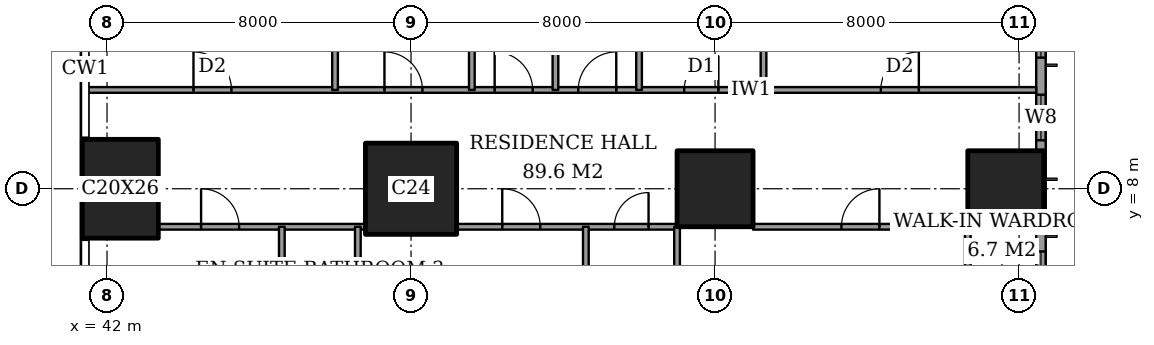
"""IFC4 building model, lengths in metres.
Left out: names, types, materials, properties, quantities, classifications, styles, units other than length and angle.
Written with IfcOpenShell. Run it as: python <this file> out.ifc"""

import sys

from ifc_helpers import new_model, si_unit, direction, frame, frame_2d, origin, origin_2d, place, context, subcontext, project, spatial, rectangle, extrude, element, fill, save


model = new_model("IFC4")
c1 = context("Model", 3, precision=1e-05, world=origin(), true_north=direction((0.0, 1.0)))
c2 = subcontext(c1, "Body", "Model", "MODEL_VIEW")
j1 = project(units=[si_unit("LENGTHUNIT", "METRE"), si_unit("PLANEANGLEUNIT", "RADIAN")], contexts=[c1])
p1 = place(None, origin())
s1 = spatial("IfcSite", under=j1, at=p1, CompositionType="ELEMENT")
p2 = place(p1, origin())
s2 = spatial("IfcBuilding", under=s1, at=p2, CompositionType="ELEMENT")
p3 = place(p2, frame((0.0, 0.0, 69.2)))
s3 = spatial("IfcBuildingStorey", under=s2, at=p3, CompositionType="ELEMENT", Elevation=69.2)
p4 = place(p3, frame((42.35, 8.0, 0.0), z_axis=(0.0, 0.0, 1.0), x_axis=(1.0, 0.0, 0.0)))
e1 = element("IfcColumn", 1, at=p4, inside=s3, PredefinedType="COLUMN", context=c2, shape_type="SweptSolid", body=[
    extrude(rectangle(XDim=2.0, YDim=2.6, at=origin_2d()), origin(), (0.0, 0.0, 1.0), 3.6),
])
p5 = place(p3, frame((50.0, 8.0, 0.0), z_axis=(0.0, 0.0, 1.0), x_axis=(1.0, 0.0, 0.0)))
e2 = element("IfcColumn", 2, at=p5, inside=s3, PredefinedType="COLUMN", context=c2, shape_type="SweptSolid", body=[
    extrude(rectangle(XDim=2.4, YDim=2.4, at=origin_2d()), origin(), (0.0, 0.0, 1.0), 3.6),
])
for number, where, z_axis, x_axis in (
    (3, (58.0, 8.0, 0.0), (0.0, 0.0, 1.0), (1.0, 0.0, 0.0)),
    (4, (65.65, 8.0, 0.0), (0.0, 0.0, 1.0), (1.0, 0.0, 0.0)),
):
    element("IfcColumn", number, at=place(p3, frame(where, z_axis=z_axis, x_axis=x_axis)), inside=s3, PredefinedType="COLUMN", context=c2, shape_type="SweptSolid", body=[
        extrude(rectangle(XDim=2.0, YDim=2.0, at=origin_2d()), origin(), (0.0, 0.0, 1.0), 3.6),
    ])
p6 = place(p3, frame((66.575, 3.175, 0.0), z_axis=(0.0, 0.0, 1.0), x_axis=(0.0, 1.0, 0.0)))
e5 = element("IfcWall", 5, at=p6, inside=s3, PredefinedType="SOLIDWALL", context=c2, shape_type="SweptSolid", body=[
    extrude(rectangle(XDim=41.65, YDim=0.25, at=frame_2d((20.825, 0.0))), origin(), (0.0, 0.0, 1.0), 3.6),
])
p7 = place(p6, frame((0.775, 0.0, 0.6)))
e6 = element("IfcOpeningElement", 6, at=p7, cuts=e5, PredefinedType="OPENING", context=c2, shape_type="SweptSolid", body=[
    extrude(rectangle(XDim=2.4, YDim=2.0, at=frame_2d((1.2, 1.0))), frame((0.0, 0.135, 0.0), z_axis=(0.0, -1.0, 0.0), x_axis=(1.0, 0.0, 0.0)), (0.0, 0.0, 1.0), 0.27),
])
p8 = place(p6, frame((6.1, 0.0, 0.6)))
e7 = element("IfcOpeningElement", 7, at=p8, cuts=e5, PredefinedType="OPENING", context=c2, shape_type="SweptSolid", body=[
    extrude(rectangle(XDim=1.2, YDim=2.0, at=frame_2d((0.6, 1.0))), frame((0.0, 0.135, 0.0), z_axis=(0.0, -1.0, 0.0), x_axis=(1.0, 0.0, 0.0)), (0.0, 0.0, 1.0), 0.27),
])
p9 = place(p6, frame((8.275, 0.0, 0.6)))
e8 = element("IfcOpeningElement", 8, at=p9, cuts=e5, PredefinedType="OPENING", context=c2, shape_type="SweptSolid", body=[
    extrude(rectangle(XDim=2.4, YDim=2.0, at=frame_2d((1.2, 1.0))), frame((0.0, 0.135, 0.0), z_axis=(0.0, -1.0, 0.0), x_axis=(1.0, 0.0, 0.0)), (0.0, 0.0, 1.0), 0.27),
])
p10 = place(p6, frame((15.775, 0.0, 0.6)))
e9 = element("IfcOpeningElement", 9, at=p10, cuts=e5, PredefinedType="OPENING", context=c2, shape_type="SweptSolid", body=[
    extrude(rectangle(XDim=2.4, YDim=2.0, at=frame_2d((1.2, 1.0))), frame((0.0, 0.135, 0.0), z_axis=(0.0, -1.0, 0.0), x_axis=(1.0, 0.0, 0.0)), (0.0, 0.0, 1.0), 0.27),
])
p11 = place(p6, frame((23.475, 0.0, 0.6)))
e10 = element("IfcOpeningElement", 10, at=p11, cuts=e5, PredefinedType="OPENING", context=c2, shape_type="SweptSolid", body=[
    extrude(rectangle(XDim=2.4, YDim=2.0, at=frame_2d((1.2, 1.0))), frame((0.0, 0.135, 0.0), z_axis=(0.0, -1.0, 0.0), x_axis=(1.0, 0.0, 0.0)), (0.0, 0.0, 1.0), 0.27),
])
p12 = place(p6, frame((30.975, 0.0, 0.6)))
e11 = element("IfcOpeningElement", 11, at=p12, cuts=e5, PredefinedType="OPENING", context=c2, shape_type="SweptSolid", body=[
    extrude(rectangle(XDim=2.4, YDim=2.0, at=frame_2d((1.2, 1.0))), frame((0.0, 0.135, 0.0), z_axis=(0.0, -1.0, 0.0), x_axis=(1.0, 0.0, 0.0)), (0.0, 0.0, 1.0), 0.27),
])
p13 = place(p6, frame((34.5, 0.0, 0.6)))
e12 = element("IfcOpeningElement", 12, at=p13, cuts=e5, PredefinedType="OPENING", context=c2, shape_type="SweptSolid", body=[
    extrude(rectangle(XDim=1.2, YDim=2.0, at=frame_2d((0.6, 1.0))), frame((0.0, 0.135, 0.0), z_axis=(0.0, -1.0, 0.0), x_axis=(1.0, 0.0, 0.0)), (0.0, 0.0, 1.0), 0.27),
])
p14 = place(p6, frame((38.475, 0.0, 0.6)))
e13 = element("IfcOpeningElement", 13, at=p14, cuts=e5, PredefinedType="OPENING", context=c2, shape_type="SweptSolid", body=[
    extrude(rectangle(XDim=2.4, YDim=2.0, at=frame_2d((1.2, 1.0))), frame((0.0, 0.135, 0.0), z_axis=(0.0, -1.0, 0.0), x_axis=(1.0, 0.0, 0.0)), (0.0, 0.0, 1.0), 0.27),
])
p15 = place(p3, frame((43.35, 7.0, 0.0), z_axis=(0.0, 0.0, 1.0), x_axis=(1.0, 0.0, 0.0)))
e14 = element("IfcWall", 14, at=p15, inside=s3, PredefinedType="PARTITIONING", context=c2, shape_type="SweptSolid", body=[
    extrude(rectangle(XDim=5.45, YDim=0.15, at=frame_2d((2.725, 0.0))), origin(), (0.0, 0.0, 1.0), 3.35),
])
p16 = place(p15, frame((1.125, 0.0, 0.0)))
e15 = element("IfcOpeningElement", 15, at=p16, cuts=e14, PredefinedType="OPENING", context=c2, shape_type="SweptSolid", body=[
    extrude(rectangle(XDim=1.0, YDim=2.1, at=frame_2d((0.5, 1.05))), frame((0.0, 0.085, 0.0), z_axis=(0.0, -1.0, 0.0), x_axis=(1.0, 0.0, 0.0)), (0.0, 0.0, 1.0), 0.17),
])
p17 = place(p3, frame((51.2, 7.0, 0.0), z_axis=(0.0, 0.0, 1.0), x_axis=(1.0, 0.0, 0.0)))
e16 = element("IfcWall", 16, at=p17, inside=s3, PredefinedType="PARTITIONING", context=c2, shape_type="SweptSolid", body=[
    extrude(rectangle(XDim=5.8, YDim=0.15, at=frame_2d((2.9, 0.0))), origin(), (0.0, 0.0, 1.0), 3.35),
])
p18 = place(p17, frame((4.15, 0.0, 0.0)))
e17 = element("IfcOpeningElement", 17, at=p18, cuts=e16, PredefinedType="OPENING", context=c2, shape_type="SweptSolid", body=[
    extrude(rectangle(XDim=0.9, YDim=2.1, at=frame_2d((0.45, 1.05))), frame((0.0, 0.085, 0.0), z_axis=(0.0, -1.0, 0.0), x_axis=(1.0, 0.0, 0.0)), (0.0, 0.0, 1.0), 0.17),
])
p19 = place(p17, frame((1.2, 0.0, 0.0)))
e18 = element("IfcOpeningElement", 18, at=p19, cuts=e16, PredefinedType="OPENING", context=c2, shape_type="SweptSolid", body=[
    extrude(rectangle(XDim=1.0, YDim=2.1, at=frame_2d((0.5, 1.05))), frame((0.0, 0.085, 0.0), z_axis=(0.0, -1.0, 0.0), x_axis=(1.0, 0.0, 0.0)), (0.0, 0.0, 1.0), 0.17),
])
p20 = place(p3, frame((59.0, 7.0, 0.0), z_axis=(0.0, 0.0, 1.0), x_axis=(1.0, 0.0, 0.0)))
e19 = element("IfcWall", 19, at=p20, inside=s3, PredefinedType="PARTITIONING", context=c2, shape_type="SweptSolid", body=[
    extrude(rectangle(XDim=5.65, YDim=0.15, at=frame_2d((2.825, 0.0))), origin(), (0.0, 0.0, 1.0), 3.35),
])
p21 = place(p20, frame((2.325, 0.0, 0.0)))
e20 = element("IfcOpeningElement", 20, at=p21, cuts=e19, PredefinedType="OPENING", context=c2, shape_type="SweptSolid", body=[
    extrude(rectangle(XDim=1.0, YDim=2.1, at=frame_2d((0.5, 1.05))), frame((0.0, 0.085, 0.0), z_axis=(0.0, -1.0, 0.0), x_axis=(1.0, 0.0, 0.0)), (0.0, 0.0, 1.0), 0.17),
])
p22 = place(p3, frame((41.439, 10.6, 0.0), z_axis=(0.0, 0.0, 1.0), x_axis=(1.0, 0.0, 0.0)))
e21 = element("IfcWall", 21, at=p22, inside=s3, PredefinedType="PARTITIONING", context=c2, shape_type="SweptSolid", body=[
    extrude(rectangle(XDim=25.011, YDim=0.15, at=frame_2d((12.505, 0.0))), origin(), (0.0, 0.0, 1.0), 3.35),
])
p23 = place(p22, frame((10.761, 0.0, 0.0)))
e22 = element("IfcOpeningElement", 22, at=p23, cuts=e21, PredefinedType="OPENING", context=c2, shape_type="SweptSolid", body=[
    extrude(rectangle(XDim=1.0, YDim=2.1, at=frame_2d((0.5, 1.05))), frame((0.0, 0.085, 0.0), z_axis=(0.0, -1.0, 0.0), x_axis=(1.0, 0.0, 0.0)), (0.0, 0.0, 1.0), 0.17),
])
p24 = place(p22, frame((20.924, 0.0, 0.0)))
e23 = element("IfcOpeningElement", 23, at=p24, cuts=e21, PredefinedType="OPENING", context=c2, shape_type="SweptSolid", body=[
    extrude(rectangle(XDim=1.0, YDim=2.1, at=frame_2d((0.5, 1.05))), frame((0.0, 0.085, 0.0), z_axis=(0.0, -1.0, 0.0), x_axis=(1.0, 0.0, 0.0)), (0.0, 0.0, 1.0), 0.17),
])
p25 = place(p22, frame((15.749, 0.0, 0.0)))
e24 = element("IfcOpeningElement", 24, at=p25, cuts=e21, PredefinedType="OPENING", context=c2, shape_type="SweptSolid", body=[
    extrude(rectangle(XDim=0.9, YDim=2.1, at=frame_2d((0.45, 1.05))), frame((0.0, 0.085, 0.0), z_axis=(0.0, -1.0, 0.0), x_axis=(1.0, 0.0, 0.0)), (0.0, 0.0, 1.0), 0.17),
])
p26 = place(p22, frame((12.961, 0.0, 0.0)))
e25 = element("IfcOpeningElement", 25, at=p26, cuts=e21, PredefinedType="OPENING", context=c2, shape_type="SweptSolid", body=[
    extrude(rectangle(XDim=1.0, YDim=2.1, at=frame_2d((0.5, 1.05))), frame((0.0, 0.085, 0.0), z_axis=(0.0, -1.0, 0.0), x_axis=(1.0, 0.0, 0.0)), (0.0, 0.0, 1.0), 0.17),
])
p27 = place(p22, frame((7.861, 0.0, 0.0)))
e26 = element("IfcOpeningElement", 26, at=p27, cuts=e21, PredefinedType="OPENING", context=c2, shape_type="SweptSolid", body=[
    extrude(rectangle(XDim=1.0, YDim=2.1, at=frame_2d((0.5, 1.05))), frame((0.0, 0.085, 0.0), z_axis=(0.0, -1.0, 0.0), x_axis=(1.0, 0.0, 0.0)), (0.0, 0.0, 1.0), 0.17),
])
p28 = place(p22, frame((2.836, 0.0, 0.0)))
e27 = element("IfcOpeningElement", 27, at=p28, cuts=e21, PredefinedType="OPENING", context=c2, shape_type="SweptSolid", body=[
    extrude(rectangle(XDim=1.0, YDim=2.1, at=frame_2d((0.5, 1.05))), frame((0.0, 0.085, 0.0), z_axis=(0.0, -1.0, 0.0), x_axis=(1.0, 0.0, 0.0)), (0.0, 0.0, 1.0), 0.17),
])
p29 = place(p3, frame((46.6, -0.45, 0.0), z_axis=(0.0, 0.0, 1.0), x_axis=(0.0, 1.0, 0.0)))
e28 = element("IfcWall", 28, at=p29, inside=s3, PredefinedType="PARTITIONING", context=c2, shape_type="SweptSolid", body=[
    extrude(rectangle(XDim=7.45, YDim=0.15, at=frame_2d((3.725, 0.0))), origin(), (0.0, 0.0, 1.0), 3.35),
])
p30 = place(p29, frame((3.275, 0.0, 0.0)))
e29 = element("IfcOpeningElement", 29, at=p30, cuts=e28, PredefinedType="OPENING", context=c2, shape_type="SweptSolid", body=[
    extrude(rectangle(XDim=0.9, YDim=2.1, at=frame_2d((0.45, 1.05))), frame((0.0, 0.085, 0.0), z_axis=(0.0, -1.0, 0.0), x_axis=(1.0, 0.0, 0.0)), (0.0, 0.0, 1.0), 0.17),
])
p31 = place(p3, frame((48.0, 10.6, 0.0), z_axis=(0.0, 0.0, 1.0), x_axis=(0.0, 1.0, 0.0)))
e30 = element("IfcWall", 30, at=p31, inside=s3, PredefinedType="PARTITIONING", context=c2, shape_type="SweptSolid", body=[
    extrude(rectangle(XDim=6.4, YDim=0.15, at=frame_2d((3.2, 0.0))), origin(), (0.0, 0.0, 1.0), 3.35),
])
p32 = place(p3, frame((48.6, -0.45, 0.0), z_axis=(0.0, 0.0, 1.0), x_axis=(0.0, 1.0, 0.0)))
e31 = element("IfcWall", 31, at=p32, inside=s3, PredefinedType="PARTITIONING", context=c2, shape_type="SweptSolid", body=[
    extrude(rectangle(XDim=7.45, YDim=0.15, at=frame_2d((3.725, 0.0))), origin(), (0.0, 0.0, 1.0), 3.35),
])
for number, where, z_axis, x_axis in (
    (32, (51.6, 10.6, 0.0), (0.0, 0.0, 1.0), (0.0, 1.0, 0.0)),
    (33, (53.8, 10.6, 0.0), (0.0, 0.0, 1.0), (0.0, 1.0, 0.0)),
):
    element("IfcWall", number, at=place(p3, frame(where, z_axis=z_axis, x_axis=x_axis)), inside=s3, PredefinedType="PARTITIONING", context=c2, shape_type="SweptSolid", body=[
        extrude(rectangle(XDim=6.4, YDim=0.15, at=frame_2d((3.2, 0.0))), origin(), (0.0, 0.0, 1.0), 3.35),
    ])
p33 = place(p3, frame((54.6, -0.45, 0.0), z_axis=(0.0, 0.0, 1.0), x_axis=(0.0, 1.0, 0.0)))
e34 = element("IfcWall", 34, at=p33, inside=s3, PredefinedType="PARTITIONING", context=c2, shape_type="SweptSolid", body=[
    extrude(rectangle(XDim=7.45, YDim=0.15, at=frame_2d((3.725, 0.0))), origin(), (0.0, 0.0, 1.0), 3.35),
])
p34 = place(p3, frame((56.0, 10.6, 0.0), z_axis=(0.0, 0.0, 1.0), x_axis=(0.0, 1.0, 0.0)))
e35 = element("IfcWall", 35, at=p34, inside=s3, PredefinedType="PARTITIONING", context=c2, shape_type="SweptSolid", body=[
    extrude(rectangle(XDim=11.0, YDim=0.15, at=frame_2d((5.5, 0.0))), origin(), (0.0, 0.0, 1.0), 3.35),
])
p35 = place(p34, frame((8.2, 0.0, 0.0)))
e36 = element("IfcOpeningElement", 36, at=p35, cuts=e35, PredefinedType="OPENING", context=c2, shape_type="SweptSolid", body=[
    extrude(rectangle(XDim=1.0, YDim=2.1, at=frame_2d((0.5, 1.05))), frame((0.0, 0.085, 0.0), z_axis=(0.0, -1.0, 0.0), x_axis=(1.0, 0.0, 0.0)), (0.0, 0.0, 1.0), 0.17),
])
p36 = place(p3, frame((57.0, 1.35, 0.0), z_axis=(0.0, 0.0, 1.0), x_axis=(0.0, 1.0, 0.0)))
e37 = element("IfcWall", 37, at=p36, inside=s3, PredefinedType="PARTITIONING", context=c2, shape_type="SweptSolid", body=[
    extrude(rectangle(XDim=5.65, YDim=0.15, at=frame_2d((2.825, 0.0))), origin(), (0.0, 0.0, 1.0), 3.35),
])
p37 = place(p3, frame((59.275, 10.6, 0.0), z_axis=(0.0, 0.0, 1.0), x_axis=(0.0, 1.0, 0.0)))
e38 = element("IfcWall", 38, at=p37, inside=s3, PredefinedType="PARTITIONING", context=c2, shape_type="SweptSolid", body=[
    extrude(rectangle(XDim=4.2, YDim=0.15, at=frame_2d((2.1, 0.0))), origin(), (0.0, 0.0, 1.0), 3.35),
])
p38 = place(p3, frame((64.65, 3.3, 0.0), z_axis=(0.0, 0.0, 1.0), x_axis=(0.0, 1.0, 0.0)))
e39 = element("IfcWall", 39, at=p38, inside=s3, PredefinedType="PARTITIONING", context=c2, shape_type="SweptSolid", body=[
    extrude(rectangle(XDim=3.7, YDim=0.15, at=frame_2d((1.85, 0.0))), origin(), (0.0, 0.0, 1.0), 3.35),
])
p39 = place(p38, frame((1.4, 0.0, 0.0)))
e40 = element("IfcOpeningElement", 40, at=p39, cuts=e39, PredefinedType="OPENING", context=c2, shape_type="SweptSolid", body=[
    extrude(rectangle(XDim=0.9, YDim=2.1, at=frame_2d((0.45, 1.05))), frame((0.0, 0.085, 0.0), z_axis=(0.0, -1.0, 0.0), x_axis=(1.0, 0.0, 0.0)), (0.0, 0.0, 1.0), 0.17),
])
p40 = place(p7, origin())
e41 = element("IfcWindow", 41, at=p40, inside=s3, PartitioningType="SINGLE_PANEL", PredefinedType="WINDOW", context=c2, shape_type="SweptSolid", body=[
    extrude(rectangle(XDim=2.4, YDim=2.0, at=frame_2d((1.2, 1.0))), frame((0.0, 0.03, 0.0), z_axis=(0.0, -1.0, 0.0), x_axis=(1.0, 0.0, 0.0)), (0.0, 0.0, 1.0), 0.06),
])
fill(e6, e41)
p41 = place(p8, origin())
e42 = element("IfcWindow", 42, at=p41, inside=s3, PartitioningType="SINGLE_PANEL", PredefinedType="WINDOW", context=c2, shape_type="SweptSolid", body=[
    extrude(rectangle(XDim=1.2, YDim=2.0, at=frame_2d((0.6, 1.0))), frame((0.0, 0.03, 0.0), z_axis=(0.0, -1.0, 0.0), x_axis=(1.0, 0.0, 0.0)), (0.0, 0.0, 1.0), 0.06),
])
fill(e7, e42)
p42 = place(p9, origin())
e43 = element("IfcWindow", 43, at=p42, inside=s3, PartitioningType="SINGLE_PANEL", PredefinedType="WINDOW", context=c2, shape_type="SweptSolid", body=[
    extrude(rectangle(XDim=2.4, YDim=2.0, at=frame_2d((1.2, 1.0))), frame((0.0, 0.03, 0.0), z_axis=(0.0, -1.0, 0.0), x_axis=(1.0, 0.0, 0.0)), (0.0, 0.0, 1.0), 0.06),
])
fill(e8, e43)
p43 = place(p21, origin())
e44 = element("IfcDoor", 44, at=p43, inside=s3, OperationType="SINGLE_SWING_LEFT", PredefinedType="DOOR", context=c2, shape_type="SweptSolid", body=[
    extrude(rectangle(XDim=1.0, YDim=2.1, at=frame_2d((0.5, 1.05))), frame((0.0, 0.025, 0.0), z_axis=(0.0, -1.0, 0.0), x_axis=(1.0, 0.0, 0.0)), (0.0, 0.0, 1.0), 0.05),
])
fill(e20, e44)
p44 = place(p18, origin())
e45 = element("IfcDoor", 45, at=p44, inside=s3, OperationType="SINGLE_SWING_LEFT", PredefinedType="DOOR", context=c2, shape_type="SweptSolid", body=[
    extrude(rectangle(XDim=0.9, YDim=2.1, at=frame_2d((0.45, 1.05))), frame((0.0, 0.025, 0.0), z_axis=(0.0, -1.0, 0.0), x_axis=(1.0, 0.0, 0.0)), (0.0, 0.0, 1.0), 0.05),
])
fill(e17, e45)
p45 = place(p19, origin())
e46 = element("IfcDoor", 46, at=p45, inside=s3, OperationType="SINGLE_SWING_RIGHT", PredefinedType="DOOR", context=c2, shape_type="SweptSolid", body=[
    extrude(rectangle(XDim=1.0, YDim=2.1, at=frame_2d((0.5, 1.05))), frame((0.0, 0.025, 0.0), z_axis=(0.0, -1.0, 0.0), x_axis=(1.0, 0.0, 0.0)), (0.0, 0.0, 1.0), 0.05),
])
fill(e18, e46)
p46 = place(p16, origin())
e47 = element("IfcDoor", 47, at=p46, inside=s3, OperationType="SINGLE_SWING_RIGHT", PredefinedType="DOOR", context=c2, shape_type="SweptSolid", body=[
    extrude(rectangle(XDim=1.0, YDim=2.1, at=frame_2d((0.5, 1.05))), frame((0.0, 0.025, 0.0), z_axis=(0.0, -1.0, 0.0), x_axis=(1.0, 0.0, 0.0)), (0.0, 0.0, 1.0), 0.05),
])
fill(e15, e47)
p47 = place(p23, origin())
e48 = element("IfcDoor", 48, at=p47, inside=s3, OperationType="SINGLE_SWING_RIGHT", PredefinedType="DOOR", context=c2, shape_type="SweptSolid", body=[
    extrude(rectangle(XDim=1.0, YDim=2.1, at=frame_2d((0.5, 1.05))), frame((0.0, 0.025, 0.0), z_axis=(0.0, -1.0, 0.0), x_axis=(1.0, 0.0, 0.0)), (0.0, 0.0, 1.0), 0.05),
])
fill(e22, e48)
p48 = place(p24, origin())
e49 = element("IfcDoor", 49, at=p48, inside=s3, OperationType="SINGLE_SWING_LEFT", PredefinedType="DOOR", context=c2, shape_type="SweptSolid", body=[
    extrude(rectangle(XDim=1.0, YDim=2.1, at=frame_2d((0.5, 1.05))), frame((0.0, 0.025, 0.0), z_axis=(0.0, -1.0, 0.0), x_axis=(1.0, 0.0, 0.0)), (0.0, 0.0, 1.0), 0.05),
])
fill(e23, e49)
p49 = place(p25, origin())
e50 = element("IfcDoor", 50, at=p49, inside=s3, OperationType="SINGLE_SWING_LEFT", PredefinedType="DOOR", context=c2, shape_type="SweptSolid", body=[
    extrude(rectangle(XDim=0.9, YDim=2.1, at=frame_2d((0.45, 1.05))), frame((0.0, 0.025, 0.0), z_axis=(0.0, -1.0, 0.0), x_axis=(1.0, 0.0, 0.0)), (0.0, 0.0, 1.0), 0.05),
])
fill(e24, e50)
p50 = place(p26, origin())
e51 = element("IfcDoor", 51, at=p50, inside=s3, OperationType="SINGLE_SWING_LEFT", PredefinedType="DOOR", context=c2, shape_type="SweptSolid", body=[
    extrude(rectangle(XDim=1.0, YDim=2.1, at=frame_2d((0.5, 1.05))), frame((0.0, 0.025, 0.0), z_axis=(0.0, -1.0, 0.0), x_axis=(1.0, 0.0, 0.0)), (0.0, 0.0, 1.0), 0.05),
])
fill(e25, e51)
p51 = place(p27, origin())
e52 = element("IfcDoor", 52, at=p51, inside=s3, OperationType="SINGLE_SWING_RIGHT", PredefinedType="DOOR", context=c2, shape_type="SweptSolid", body=[
    extrude(rectangle(XDim=1.0, YDim=2.1, at=frame_2d((0.5, 1.05))), frame((0.0, 0.025, 0.0), z_axis=(0.0, -1.0, 0.0), x_axis=(1.0, 0.0, 0.0)), (0.0, 0.0, 1.0), 0.05),
])
fill(e26, e52)
p52 = place(p28, origin())
e53 = element("IfcDoor", 53, at=p52, inside=s3, OperationType="SINGLE_SWING_RIGHT", PredefinedType="DOOR", context=c2, shape_type="SweptSolid", body=[
    extrude(rectangle(XDim=1.0, YDim=2.1, at=frame_2d((0.5, 1.05))), frame((0.0, 0.025, 0.0), z_axis=(0.0, -1.0, 0.0), x_axis=(1.0, 0.0, 0.0)), (0.0, 0.0, 1.0), 0.05),
])
fill(e27, e53)
save(model, sys.argv[1])
